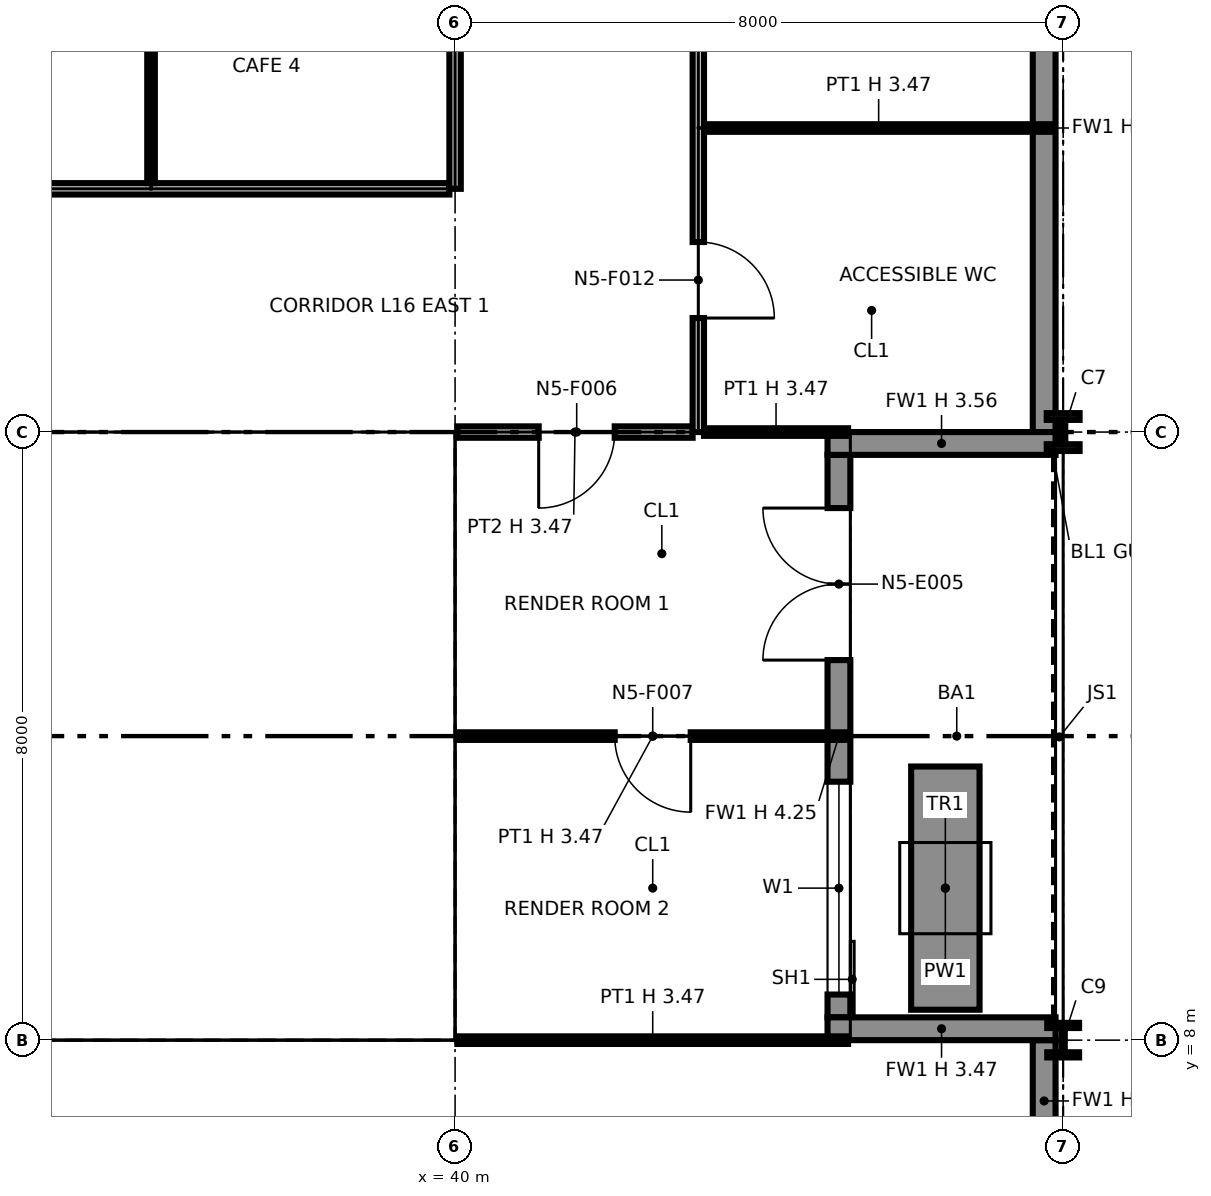
"""IFC4 building model, lengths in metres.
Left out: names, types, materials, properties, quantities, classifications, styles, units other than length and angle.
Written with IfcOpenShell. Run it as: python <this file> out.ifc"""

import sys

from ifc_helpers import new_model, si_unit, direction, frame, frame_2d, origin, origin_2d, place, context, subcontext, project, spatial, polyline, rectangle, i_section, outline, extrude, element, fill, save


model = new_model("IFC4")
c1 = context("Model", 3, precision=1e-05, world=origin(), true_north=direction((0.0, 1.0)))
c2 = subcontext(c1, "Body", "Model", "MODEL_VIEW")
j1 = project(units=[si_unit("LENGTHUNIT", "METRE"), si_unit("PLANEANGLEUNIT", "RADIAN")], contexts=[c1])
p1 = place(None, origin())
s1 = spatial("IfcSite", under=j1, at=p1, CompositionType="ELEMENT")
p2 = place(p1, origin())
s2 = spatial("IfcBuilding", under=s1, at=p2, CompositionType="ELEMENT")
p3 = place(p2, frame((0.0, 0.0, 87.6)))
s3 = spatial("IfcBuildingStorey", under=s2, at=p3, CompositionType="ELEMENT", Elevation=87.6)
for number, where, z_axis, x_axis in (
    (1, (40.0, 8.0, 0.0), (0.0, 0.0, 1.0), (1.0, 0.0, 0.0)),
    (2, (40.0, 16.0, 0.0), (0.0, 0.0, 1.0), (1.0, 0.0, 0.0)),
):
    element("IfcColumn", number, at=place(p3, frame(where, z_axis=z_axis, x_axis=x_axis)), inside=s3, PredefinedType="COLUMN", context=c2, shape_type="SweptSolid", body=[
        extrude(i_section(OverallWidth=0.406, OverallDepth=0.417, WebThickness=0.03, FlangeThickness=0.048, at=origin_2d()), origin(), (0.0, 0.0, 1.0), 4.25),
    ])
p4 = place(p3, frame((48.0, 8.0, 0.0), z_axis=(0.0, 0.0, 1.0), x_axis=(1.0, 0.0, 0.0)))
e3 = element("IfcColumn", 3, at=p4, inside=s3, PredefinedType="COLUMN", context=c2, shape_type="SweptSolid", body=[
    extrude(i_section(OverallWidth=0.419, OverallDepth=0.455, WebThickness=0.042, FlangeThickness=0.068, at=origin_2d()), origin(), (0.0, 0.0, 1.0), 4.25),
])
p5 = place(p3, frame((48.0, 16.0, 0.0), z_axis=(0.0, 0.0, 1.0), x_axis=(1.0, 0.0, 0.0)))
e4 = element("IfcColumn", 4, at=p5, inside=s3, PredefinedType="COLUMN", context=c2, shape_type="SweptSolid", body=[
    extrude(i_section(OverallWidth=0.432, OverallDepth=0.498, WebThickness=0.056, FlangeThickness=0.089, at=origin_2d()), origin(), (0.0, 0.0, 1.0), 4.25),
])
p6 = place(p3, frame((47.75, 6.4, 0.0), z_axis=(0.0, 0.0, 1.0), x_axis=(0.0, 1.0, 0.0)))
e5 = element("IfcWall", 5, at=p6, inside=s3, PredefinedType="SOLIDWALL", context=c2, shape_type="SweptSolid", body=[
    extrude(rectangle(XDim=1.6, YDim=0.3, at=frame_2d((0.8, 0.0))), origin(), (0.0, 0.0, 1.0), 4.25),
])
p7 = place(p3, frame((45.05, 8.3, 0.0), z_axis=(0.0, 0.0, 1.0), x_axis=(0.0, 1.0, 0.0)))
e6 = element("IfcWall", 6, at=p7, inside=s3, PredefinedType="SOLIDWALL", context=c2, shape_type="SweptSolid", body=[
    extrude(rectangle(XDim=7.4, YDim=0.3, at=frame_2d((3.7, 0.0))), origin(), (0.0, 0.0, 1.0), 4.25),
])
p8 = place(p7, frame((0.3, 0.0, 0.9)))
e7 = element("IfcOpeningElement", 7, at=p8, cuts=e6, PredefinedType="OPENING", context=c2, shape_type="SweptSolid", body=[
    extrude(rectangle(XDim=2.8, YDim=2.2, at=frame_2d((1.4, 1.1))), frame((0.0, 0.16, 0.0), z_axis=(0.0, -1.0, 0.0), x_axis=(1.0, 0.0, 0.0)), (0.0, 0.0, 1.0), 0.32),
])
p9 = place(p7, frame((4.7, 0.0, 0.0)))
e8 = element("IfcOpeningElement", 8, at=p9, cuts=e6, PredefinedType="OPENING", context=c2, shape_type="SweptSolid", body=[
    extrude(rectangle(XDim=2.0, YDim=2.4, at=frame_2d((1.0, 1.2))), frame((0.0, 0.16, 0.0), z_axis=(0.0, -1.0, 0.0), x_axis=(1.0, 0.0, 0.0)), (0.0, 0.0, 1.0), 0.32),
])
p10 = place(p3, frame((47.9, 8.15, 0.0), z_axis=(0.0, 0.0, 1.0), x_axis=(-1.0, 0.0, 0.0)))
e9 = element("IfcWall", 9, at=p10, inside=s3, PredefinedType="SOLIDWALL", context=c2, shape_type="SweptSolid", body=[
    extrude(rectangle(XDim=3.0, YDim=0.3, at=frame_2d((1.5, 0.0))), origin(), (0.0, 0.0, 1.0), 3.469),
])
p11 = place(p3, frame((47.9, 15.85, 0.0), z_axis=(0.0, 0.0, 1.0), x_axis=(-1.0, 0.0, 0.0)))
e10 = element("IfcWall", 10, at=p11, inside=s3, PredefinedType="SOLIDWALL", context=c2, shape_type="SweptSolid", body=[
    extrude(rectangle(XDim=3.0, YDim=0.3, at=frame_2d((1.5, 0.0))), origin(), (0.0, 0.0, 1.0), 3.556),
])
p12 = place(p3, frame((47.75, 16.0, 0.0), z_axis=(0.0, 0.0, 1.0), x_axis=(0.0, 1.0, 0.0)))
e11 = element("IfcWall", 11, at=p12, inside=s3, PredefinedType="SOLIDWALL", context=c2, shape_type="SweptSolid", body=[
    extrude(rectangle(XDim=8.0, YDim=0.3, at=frame_2d((4.0, 0.0))), origin(), (0.0, 0.0, 1.0), 4.25),
])
p13 = place(p3, frame((46.45, 8.4, 0.0), z_axis=(0.0, 0.0, 1.0), x_axis=(0.0, 1.0, 0.0)))
e12 = element("IfcWall", 12, at=p13, inside=s3, PredefinedType="SOLIDWALL", context=c2, shape_type="SweptSolid", body=[
    extrude(rectangle(XDim=3.2, YDim=0.9, at=frame_2d((1.6, 0.0))), origin(), (0.0, 0.0, 1.0), 0.6),
])
p14 = place(p3, frame((24.65, 8.75, 0.0), z_axis=(0.0, 0.0, 1.0), x_axis=(1.0, 0.0, 0.0)))
e13 = element("IfcWall", 13, at=p14, inside=s3, PredefinedType="PARTITIONING", context=c2, shape_type="SweptSolid", body=[
    extrude(outline(polyline([(0.0, 0.0), (14.7, 0.0), (14.7, 4.25), (7.469, 4.25), (7.469, 3.632), (7.231, 3.632), (7.23, 4.25), (0.0, 4.25), (0.0, 0.0)])), frame((0.0, 0.1, 0.0), z_axis=(0.0, -1.0, 0.0), x_axis=(1.0, 0.0, 0.0)), (0.0, 0.0, 1.0), 0.2),
])
p15 = place(p3, frame((24.65, 15.25, 0.0), z_axis=(0.0, 0.0, 1.0), x_axis=(1.0, 0.0, 0.0)))
e14 = element("IfcWall", 14, at=p15, inside=s3, PredefinedType="PARTITIONING", context=c2, shape_type="SweptSolid", body=[
    extrude(outline(polyline([(0.0, 0.0), (14.7, 0.0), (14.7, 4.25), (7.469, 4.25), (7.469, 3.632), (7.231, 3.632), (7.23, 4.25), (0.0, 4.25), (0.0, 0.0)])), frame((0.0, 0.1, 0.0), z_axis=(0.0, -1.0, 0.0), x_axis=(1.0, 0.0, 0.0)), (0.0, 0.0, 1.0), 0.2),
])
p16 = place(p15, frame((2.85, 0.0, 0.0)))
e15 = element("IfcOpeningElement", 15, at=p16, cuts=e14, PredefinedType="OPENING", context=c2, shape_type="SweptSolid", body=[
    extrude(rectangle(XDim=1.8, YDim=2.1, at=frame_2d((0.9, 1.05))), frame((0.0, 0.11, 0.0), z_axis=(0.0, -1.0, 0.0), x_axis=(1.0, 0.0, 0.0)), (0.0, 0.0, 1.0), 0.22),
])
p17 = place(p15, frame((9.95, 0.0, 0.0), z_axis=(0.0, 0.0, 1.0), x_axis=(-1.0, 0.0, 0.0)))
e16 = element("IfcOpeningElement", 16, at=p17, cuts=e14, PredefinedType="OPENING", context=c2, shape_type="SweptSolid", body=[
    extrude(rectangle(XDim=1.4, YDim=2.1, at=frame_2d((0.7, 1.05))), frame((0.0, 0.11, 0.0), z_axis=(0.0, -1.0, 0.0), x_axis=(1.0, 0.0, 0.0)), (0.0, 0.0, 1.0), 0.22),
])
p18 = place(p15, frame((13.4, 0.0, 0.0), z_axis=(0.0, 0.0, 1.0), x_axis=(-1.0, 0.0, 0.0)))
e17 = element("IfcOpeningElement", 17, at=p18, cuts=e14, PredefinedType="OPENING", context=c2, shape_type="SweptSolid", body=[
    extrude(rectangle(XDim=1.4, YDim=2.1, at=frame_2d((0.7, 1.05))), frame((0.0, 0.11, 0.0), z_axis=(0.0, -1.0, 0.0), x_axis=(1.0, 0.0, 0.0)), (0.0, 0.0, 1.0), 0.22),
])
for number, where, z_axis, x_axis in (
    (18, (35.6, 8.85, 0.0), (0.0, 0.0, 1.0), (0.0, 1.0, 0.0)),
    (19, (39.25, 8.85, 0.0), (0.0, 0.0, 1.0), (0.0, 1.0, 0.0)),
):
    element("IfcWall", number, at=place(p3, frame(where, z_axis=z_axis, x_axis=x_axis)), inside=s3, PredefinedType="PARTITIONING", context=c2, shape_type="SweptSolid", body=[
        extrude(rectangle(XDim=6.3, YDim=0.2, at=frame_2d((3.15, 0.0))), origin(), (0.0, 0.0, 1.0), 4.25),
    ])
p19 = place(p3, frame((40.03, 8.0, 0.0), z_axis=(0.0, 0.0, 1.0), x_axis=(1.0, 0.0, 0.0)))
e20 = element("IfcWall", 20, at=p19, inside=s3, PredefinedType="PARTITIONING", context=c2, shape_type="SweptSolid", body=[
    extrude(rectangle(XDim=5.14, YDim=0.1, at=frame_2d((2.57, 0.0))), origin(), (0.0, 0.0, 1.0), 3.47),
])
p20 = place(p3, frame((40.03, 12.0, 0.0), z_axis=(0.0, 0.0, 1.0), x_axis=(1.0, 0.0, 0.0)))
e21 = element("IfcWall", 21, at=p20, inside=s3, PredefinedType="PARTITIONING", context=c2, shape_type="SweptSolid", body=[
    extrude(rectangle(XDim=5.14, YDim=0.1, at=frame_2d((2.57, 0.0))), origin(), (0.0, 0.0, 1.0), 3.47),
])
p21 = place(p20, frame((3.07, 0.0, 0.0), z_axis=(0.0, 0.0, 1.0), x_axis=(-1.0, 0.0, 0.0)))
e22 = element("IfcOpeningElement", 22, at=p21, cuts=e21, PredefinedType="OPENING", context=c2, shape_type="SweptSolid", body=[
    extrude(rectangle(XDim=1.0, YDim=2.1, at=frame_2d((0.5, 1.05))), frame((0.0, 0.06, 0.0), z_axis=(0.0, -1.0, 0.0), x_axis=(1.0, 0.0, 0.0)), (0.0, 0.0, 1.0), 0.12),
])
p22 = place(p3, frame((40.03, 16.0, 0.0), z_axis=(0.0, 0.0, 1.0), x_axis=(1.0, 0.0, 0.0)))
e23 = element("IfcWall", 23, at=p22, inside=s3, PredefinedType="PARTITIONING", context=c2, shape_type="SweptSolid", body=[
    extrude(rectangle(XDim=3.095, YDim=0.15, at=frame_2d((1.547, 0.0))), origin(), (0.0, 0.0, 1.0), 3.47),
])
p23 = place(p22, frame((2.07, 0.0, 0.0), z_axis=(0.0, 0.0, 1.0), x_axis=(-1.0, 0.0, 0.0)))
e24 = element("IfcOpeningElement", 24, at=p23, cuts=e23, PredefinedType="OPENING", context=c2, shape_type="SweptSolid", body=[
    extrude(rectangle(XDim=1.0, YDim=2.1, at=frame_2d((0.5, 1.05))), frame((0.0, 0.085, 0.0), z_axis=(0.0, -1.0, 0.0), x_axis=(1.0, 0.0, 0.0)), (0.0, 0.0, 1.0), 0.17),
])
p24 = place(p3, frame((43.275, 16.0, 0.0), z_axis=(0.0, 0.0, 1.0), x_axis=(1.0, 0.0, 0.0)))
e25 = element("IfcWall", 25, at=p24, inside=s3, PredefinedType="PARTITIONING", context=c2, shape_type="SweptSolid", body=[
    extrude(rectangle(XDim=1.895, YDim=0.1, at=frame_2d((0.948, 0.0))), origin(), (0.0, 0.0, 1.0), 3.47),
])
p25 = place(p3, frame((43.2, 16.0, 0.0), z_axis=(0.0, 0.0, 1.0), x_axis=(0.0, 1.0, 0.0)))
e26 = element("IfcWall", 26, at=p25, inside=s3, PredefinedType="PARTITIONING", context=c2, shape_type="SweptSolid", body=[
    extrude(outline(polyline([(0.0, 0.0), (27.125, 0.0), (27.125, 4.25), (24.3, 4.25), (24.298, 3.47), (23.702, 3.47), (23.7, 4.25), (20.3, 4.25), (20.298, 3.47), (19.702, 3.47), (19.7, 4.25), (16.3, 4.25), (16.298, 3.47), (15.702, 3.47), (15.7, 4.25), (12.3, 4.25), (12.298, 3.47), (11.702, 3.47), (11.7, 4.25), (8.3, 4.25), (8.298, 3.47), (7.702, 3.47), (7.7, 4.25), (4.3, 4.25), (4.298, 3.47), (3.702, 3.47), (3.7, 4.25), (0.0, 4.25), (0.0, 0.0)])), frame((0.0, 0.075, 0.0), z_axis=(0.0, -1.0, 0.0), x_axis=(1.0, 0.0, 0.0)), (0.0, 0.0, 1.0), 0.15),
])
p26 = place(p25, frame((2.5, 0.0, 0.0), z_axis=(0.0, 0.0, 1.0), x_axis=(-1.0, 0.0, 0.0)))
e27 = element("IfcOpeningElement", 27, at=p26, cuts=e26, PredefinedType="OPENING", context=c2, shape_type="SweptSolid", body=[
    extrude(rectangle(XDim=1.0, YDim=2.1, at=frame_2d((0.5, 1.05))), frame((0.0, 0.085, 0.0), z_axis=(0.0, -1.0, 0.0), x_axis=(1.0, 0.0, 0.0)), (0.0, 0.0, 1.0), 0.17),
])
p27 = place(p25, frame((12.5, 0.0, 0.0), z_axis=(0.0, 0.0, 1.0), x_axis=(-1.0, 0.0, 0.0)))
e28 = element("IfcOpeningElement", 28, at=p27, cuts=e26, PredefinedType="OPENING", context=c2, shape_type="SweptSolid", body=[
    extrude(rectangle(XDim=1.0, YDim=2.1, at=frame_2d((0.5, 1.05))), frame((0.0, 0.085, 0.0), z_axis=(0.0, -1.0, 0.0), x_axis=(1.0, 0.0, 0.0)), (0.0, 0.0, 1.0), 0.17),
])
p28 = place(p25, frame((18.5, 0.0, 0.0), z_axis=(0.0, 0.0, 1.0), x_axis=(-1.0, 0.0, 0.0)))
e29 = element("IfcOpeningElement", 29, at=p28, cuts=e26, PredefinedType="OPENING", context=c2, shape_type="SweptSolid", body=[
    extrude(rectangle(XDim=1.0, YDim=2.1, at=frame_2d((0.5, 1.05))), frame((0.0, 0.085, 0.0), z_axis=(0.0, -1.0, 0.0), x_axis=(1.0, 0.0, 0.0)), (0.0, 0.0, 1.0), 0.17),
])
p29 = place(p25, frame((22.5, 0.0, 0.0), z_axis=(0.0, 0.0, 1.0), x_axis=(-1.0, 0.0, 0.0)))
e30 = element("IfcOpeningElement", 30, at=p29, cuts=e26, PredefinedType="OPENING", context=c2, shape_type="SweptSolid", body=[
    extrude(rectangle(XDim=1.0, YDim=2.1, at=frame_2d((0.5, 1.05))), frame((0.0, 0.085, 0.0), z_axis=(0.0, -1.0, 0.0), x_axis=(1.0, 0.0, 0.0)), (0.0, 0.0, 1.0), 0.17),
])
p30 = place(p25, frame((26.1, 0.0, 0.0), z_axis=(0.0, 0.0, 1.0), x_axis=(-1.0, 0.0, 0.0)))
e31 = element("IfcOpeningElement", 31, at=p30, cuts=e26, PredefinedType="OPENING", context=c2, shape_type="SweptSolid", body=[
    extrude(rectangle(XDim=1.0, YDim=2.1, at=frame_2d((0.5, 1.05))), frame((0.0, 0.085, 0.0), z_axis=(0.0, -1.0, 0.0), x_axis=(1.0, 0.0, 0.0)), (0.0, 0.0, 1.0), 0.17),
])
p31 = place(p3, frame((27.2, 19.2, 0.0), z_axis=(0.0, 0.0, 1.0), x_axis=(1.0, 0.0, 0.0)))
e32 = element("IfcWall", 32, at=p31, inside=s3, PredefinedType="PARTITIONING", context=c2, shape_type="SweptSolid", body=[
    extrude(rectangle(XDim=12.725, YDim=0.15, at=frame_2d((6.363, 0.0))), origin(), (0.0, 0.0, 1.0), 4.25),
])
p32 = place(p31, frame((1.9, 0.0, 0.0)))
e33 = element("IfcOpeningElement", 33, at=p32, cuts=e32, PredefinedType="OPENING", context=c2, shape_type="SweptSolid", body=[
    extrude(rectangle(XDim=1.0, YDim=2.1, at=frame_2d((0.5, 1.05))), frame((0.0, 0.085, 0.0), z_axis=(0.0, -1.0, 0.0), x_axis=(1.0, 0.0, 0.0)), (0.0, 0.0, 1.0), 0.17),
])
p33 = place(p31, frame((6.3, 0.0, 0.0)))
e34 = element("IfcOpeningElement", 34, at=p33, cuts=e32, PredefinedType="OPENING", context=c2, shape_type="SweptSolid", body=[
    extrude(rectangle(XDim=1.0, YDim=2.1, at=frame_2d((0.5, 1.05))), frame((0.0, 0.085, 0.0), z_axis=(0.0, -1.0, 0.0), x_axis=(1.0, 0.0, 0.0)), (0.0, 0.0, 1.0), 0.17),
])
p34 = place(p3, frame((36.0, 19.275, 0.0), z_axis=(0.0, 0.0, 1.0), x_axis=(0.0, 1.0, 0.0)))
e35 = element("IfcWall", 35, at=p34, inside=s3, PredefinedType="PARTITIONING", context=c2, shape_type="SweptSolid", body=[
    extrude(outline(polyline([(0.0, 0.0), (4.675, 0.0), (4.675, 4.25), (1.025, 4.25), (1.023, 3.47), (0.427, 3.47), (0.425, 4.25), (0.0, 4.25), (0.0, 0.0)])), frame((0.0, 0.05, 0.0), z_axis=(0.0, -1.0, 0.0), x_axis=(1.0, 0.0, 0.0)), (0.0, 0.0, 1.0), 0.1),
])
p35 = place(p3, frame((40.0, 19.2, 0.0), z_axis=(0.0, 0.0, 1.0), x_axis=(0.0, 1.0, 0.0)))
e36 = element("IfcWall", 36, at=p35, inside=s3, PredefinedType="PARTITIONING", context=c2, shape_type="SweptSolid", body=[
    extrude(rectangle(XDim=12.77, YDim=0.15, at=frame_2d((6.385, 0.0))), origin(), (0.0, 0.0, 1.0), 3.47),
])
p36 = place(p35, frame((1.9, 0.0, 0.0)))
e37 = element("IfcOpeningElement", 37, at=p36, cuts=e36, PredefinedType="OPENING", context=c2, shape_type="SweptSolid", body=[
    extrude(rectangle(XDim=1.0, YDim=2.1, at=frame_2d((0.5, 1.05))), frame((0.0, 0.085, 0.0), z_axis=(0.0, -1.0, 0.0), x_axis=(1.0, 0.0, 0.0)), (0.0, 0.0, 1.0), 0.17),
])
p37 = place(p35, frame((6.3, 0.0, 0.0)))
e38 = element("IfcOpeningElement", 38, at=p37, cuts=e36, PredefinedType="OPENING", context=c2, shape_type="SweptSolid", body=[
    extrude(rectangle(XDim=1.0, YDim=2.1, at=frame_2d((0.5, 1.05))), frame((0.0, 0.085, 0.0), z_axis=(0.0, -1.0, 0.0), x_axis=(1.0, 0.0, 0.0)), (0.0, 0.0, 1.0), 0.17),
])
p38 = place(p35, frame((10.3, 0.0, 0.0)))
e39 = element("IfcOpeningElement", 39, at=p38, cuts=e36, PredefinedType="OPENING", context=c2, shape_type="SweptSolid", body=[
    extrude(rectangle(XDim=1.0, YDim=2.1, at=frame_2d((0.5, 1.05))), frame((0.0, 0.085, 0.0), z_axis=(0.0, -1.0, 0.0), x_axis=(1.0, 0.0, 0.0)), (0.0, 0.0, 1.0), 0.17),
])
p39 = place(p3, frame((43.275, 20.0, 0.0), z_axis=(0.0, 0.0, 1.0), x_axis=(1.0, 0.0, 0.0)))
e40 = element("IfcWall", 40, at=p39, inside=s3, PredefinedType="PARTITIONING", context=c2, shape_type="SweptSolid", body=[
    extrude(rectangle(XDim=4.595, YDim=0.1, at=frame_2d((2.298, 0.0))), origin(), (0.0, 0.0, 1.0), 3.47),
])
p40 = place(p8, origin())
e41 = element("IfcWindow", 41, at=p40, inside=s3, PartitioningType="SINGLE_PANEL", PredefinedType="WINDOW", context=c2, shape_type="SweptSolid", body=[
    extrude(rectangle(XDim=2.8, YDim=2.2, at=frame_2d((1.4, 1.1))), frame((0.0, 0.03, 0.0), z_axis=(0.0, -1.0, 0.0), x_axis=(1.0, 0.0, 0.0)), (0.0, 0.0, 1.0), 0.06),
])
fill(e7, e41)
p41 = place(p9, origin())
e42 = element("IfcDoor", 42, at=p41, inside=s3, OperationType="DOUBLE_DOOR_SINGLE_SWING", PredefinedType="DOOR", context=c2, shape_type="SweptSolid", body=[
    extrude(rectangle(XDim=2.0, YDim=2.4, at=frame_2d((1.0, 1.2))), frame((0.0, 0.025, 0.0), z_axis=(0.0, -1.0, 0.0), x_axis=(1.0, 0.0, 0.0)), (0.0, 0.0, 1.0), 0.05),
])
fill(e8, e42)
p42 = place(p18, origin())
e43 = element("IfcDoor", 43, at=p42, inside=s3, OperationType="DOUBLE_DOOR_SINGLE_SWING", PredefinedType="NOTDEFINED", context=c2, shape_type="SweptSolid", body=[
    extrude(rectangle(XDim=1.4, YDim=2.1, at=frame_2d((0.7, 1.05))), frame((0.0, 0.025, 0.0), z_axis=(0.0, -1.0, 0.0), x_axis=(1.0, 0.0, 0.0)), (0.0, 0.0, 1.0), 0.05),
])
fill(e17, e43)
p43 = place(p23, origin())
e44 = element("IfcDoor", 44, at=p43, inside=s3, OperationType="SINGLE_SWING_RIGHT", PredefinedType="DOOR", context=c2, shape_type="SweptSolid", body=[
    extrude(rectangle(XDim=1.0, YDim=2.1, at=frame_2d((0.5, 1.05))), frame((0.0, 0.025, 0.0), z_axis=(0.0, -1.0, 0.0), x_axis=(1.0, 0.0, 0.0)), (0.0, 0.0, 1.0), 0.05),
])
fill(e24, e44)
p44 = place(p21, origin())
e45 = element("IfcDoor", 45, at=p44, inside=s3, OperationType="SINGLE_SWING_LEFT", PredefinedType="DOOR", context=c2, shape_type="SweptSolid", body=[
    extrude(rectangle(XDim=1.0, YDim=2.1, at=frame_2d((0.5, 1.05))), frame((0.0, 0.025, 0.0), z_axis=(0.0, -1.0, 0.0), x_axis=(1.0, 0.0, 0.0)), (0.0, 0.0, 1.0), 0.05),
])
fill(e22, e45)
p45 = place(p26, origin())
e46 = element("IfcDoor", 46, at=p45, inside=s3, OperationType="SINGLE_SWING_RIGHT", PredefinedType="DOOR", context=c2, shape_type="SweptSolid", body=[
    extrude(rectangle(XDim=1.0, YDim=2.1, at=frame_2d((0.5, 1.05))), frame((0.0, 0.025, 0.0), z_axis=(0.0, -1.0, 0.0), x_axis=(1.0, 0.0, 0.0)), (0.0, 0.0, 1.0), 0.05),
])
fill(e27, e46)
save(model, sys.argv[1])
